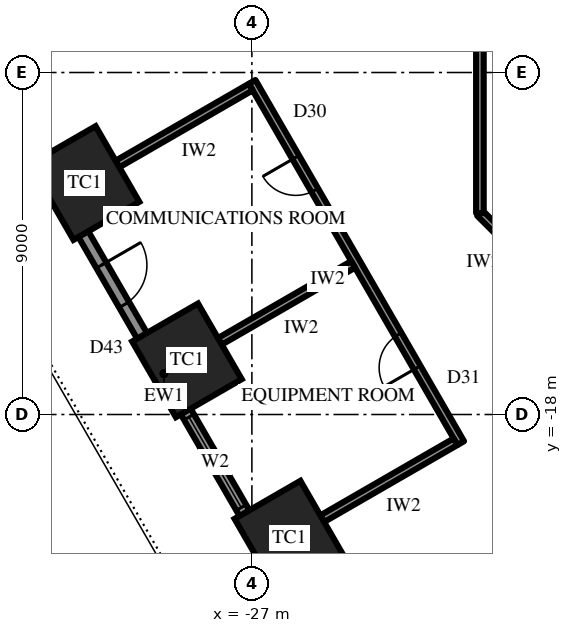
"""IFC4 building model, lengths in metres.
Left out: names, types, materials, properties, quantities, classifications, styles, units other than length and angle.
Written with IfcOpenShell. Run it as: python <this file> out.ifc"""

import sys

from ifc_helpers import new_model, si_unit, direction, frame, frame_2d, origin, origin_2d, place, context, subcontext, project, spatial, rectangle, extrude, element, fill, save


model = new_model("IFC4")
c1 = context("Model", 3, precision=1e-05, world=origin(), true_north=direction((0.0, 1.0)))
c2 = subcontext(c1, "Body", "Model", "MODEL_VIEW")
j1 = project(units=[si_unit("LENGTHUNIT", "METRE"), si_unit("PLANEANGLEUNIT", "RADIAN")], contexts=[c1])
p1 = place(None, origin())
s1 = spatial("IfcSite", under=j1, at=p1, CompositionType="ELEMENT")
p2 = place(p1, origin())
s2 = spatial("IfcBuilding", under=s1, at=p2, CompositionType="ELEMENT")
p3 = place(p2, frame((0.0, 0.0, 27.7)))
s3 = spatial("IfcBuildingStorey", under=s2, at=p3, CompositionType="ELEMENT", Elevation=27.7)
for number, where, z_axis, x_axis in (
    (1, (-31.403, -11.908, 0.0), (0.0, 0.0, 1.0), (0.5, -0.866, 0.0)),
    (2, (-28.709, -16.575, 0.0), (0.0, 0.0, 1.0), (0.5, -0.866, 0.0)),
    (3, (-26.014, -21.242, 0.0), (0.0, 0.0, 1.0), (0.5, -0.866, 0.0)),
):
    element("IfcColumn", number, at=place(p3, frame(where, z_axis=z_axis, x_axis=x_axis)), inside=s3, PredefinedType="COLUMN", context=c2, shape_type="SweptSolid", body=[
        extrude(rectangle(XDim=2.3, YDim=2.0, at=origin_2d()), origin(), (0.0, 0.0, 1.0), 4.2),
    ])
p4 = place(p3, frame((-37.398, -2.925, 0.0), z_axis=(0.0, 0.0, 1.0), x_axis=(0.499999163675, -0.866025886636, 0.0)))
e4 = element("IfcWall", 4, at=p4, inside=s3, PredefinedType="SOLIDWALL", context=c2, shape_type="SweptSolid", body=[
    extrude(rectangle(XDim=32.332, YDim=0.3, at=frame_2d((16.166, 0.0))), origin(), (0.0, 0.0, 1.0), 2.7),
])
p5 = place(p4, frame((1.319, 0.0, 0.6)))
e5 = element("IfcOpeningElement", 5, at=p5, cuts=e4, PredefinedType="OPENING", context=c2, shape_type="SweptSolid", body=[
    extrude(rectangle(XDim=2.75, YDim=1.85, at=frame_2d((1.375, 0.925))), frame((0.0, 0.16, 0.0), z_axis=(0.0, -1.0, 0.0), x_axis=(1.0, 0.0, 0.0)), (0.0, 0.0, 1.0), 0.32),
])
p6 = place(p4, frame((6.708, 0.0, 0.6)))
e6 = element("IfcOpeningElement", 6, at=p6, cuts=e4, PredefinedType="OPENING", context=c2, shape_type="SweptSolid", body=[
    extrude(rectangle(XDim=2.75, YDim=1.85, at=frame_2d((1.375, 0.925))), frame((0.0, 0.16, 0.0), z_axis=(0.0, -1.0, 0.0), x_axis=(1.0, 0.0, 0.0)), (0.0, 0.0, 1.0), 0.32),
])
p7 = place(p4, frame((12.872, 0.0, 0.0)))
e7 = element("IfcOpeningElement", 7, at=p7, cuts=e4, PredefinedType="OPENING", context=c2, shape_type="SweptSolid", body=[
    extrude(rectangle(XDim=1.2, YDim=2.4, at=frame_2d((0.6, 1.2))), frame((0.0, 0.16, 0.0), z_axis=(0.0, -1.0, 0.0), x_axis=(1.0, 0.0, 0.0)), (0.0, 0.0, 1.0), 0.32),
])
p8 = place(p4, frame((17.485, 0.0, 0.6)))
e8 = element("IfcOpeningElement", 8, at=p8, cuts=e4, PredefinedType="OPENING", context=c2, shape_type="SweptSolid", body=[
    extrude(rectangle(XDim=2.75, YDim=1.85, at=frame_2d((1.375, 0.925))), frame((0.0, 0.16, 0.0), z_axis=(0.0, -1.0, 0.0), x_axis=(1.0, 0.0, 0.0)), (0.0, 0.0, 1.0), 0.32),
])
p9 = place(p4, frame((22.874, 0.0, 0.6)))
e9 = element("IfcOpeningElement", 9, at=p9, cuts=e4, PredefinedType="OPENING", context=c2, shape_type="SweptSolid", body=[
    extrude(rectangle(XDim=2.75, YDim=1.85, at=frame_2d((1.375, 0.925))), frame((0.0, 0.16, 0.0), z_axis=(0.0, -1.0, 0.0), x_axis=(1.0, 0.0, 0.0)), (0.0, 0.0, 1.0), 0.32),
])
p10 = place(p4, frame((28.262, 0.0, 0.6)))
e10 = element("IfcOpeningElement", 10, at=p10, cuts=e4, PredefinedType="OPENING", context=c2, shape_type="SweptSolid", body=[
    extrude(rectangle(XDim=2.75, YDim=1.85, at=frame_2d((1.375, 0.925))), frame((0.0, 0.16, 0.0), z_axis=(0.0, -1.0, 0.0), x_axis=(1.0, 0.0, 0.0)), (0.0, 0.0, 1.0), 0.32),
])
p11 = place(p3, frame((-26.993, -9.247, 0.0), z_axis=(0.0, 0.0, 1.0), x_axis=(0.500002255551, -0.866024101537, 0.0)))
e11 = element("IfcWall", 11, at=p11, inside=s3, PredefinedType="PARTITIONING", context=c2, shape_type="SweptSolid", body=[
    extrude(rectangle(XDim=10.977, YDim=0.2, at=frame_2d((5.489, 0.0))), origin(), (0.0, 0.0, 1.0), 4.0),
])
p12 = place(p11, frame((2.294, 0.0, 0.0)))
e12 = element("IfcOpeningElement", 12, at=p12, cuts=e11, PredefinedType="OPENING", context=c2, shape_type="SweptSolid", body=[
    extrude(rectangle(XDim=1.0, YDim=2.2, at=frame_2d((0.5, 1.1))), frame((0.0, 0.11, 0.0), z_axis=(0.0, -1.0, 0.0), x_axis=(1.0, 0.0, 0.0)), (0.0, 0.0, 1.0), 0.22),
])
p13 = place(p11, frame((7.683, 0.0, 0.0)))
e13 = element("IfcOpeningElement", 13, at=p13, cuts=e11, PredefinedType="OPENING", context=c2, shape_type="SweptSolid", body=[
    extrude(rectangle(XDim=1.0, YDim=2.2, at=frame_2d((0.5, 1.1))), frame((0.0, 0.11, 0.0), z_axis=(0.0, -1.0, 0.0), x_axis=(1.0, 0.0, 0.0)), (0.0, 0.0, 1.0), 0.22),
])
p14 = place(p3, frame((-27.03, -9.383, 0.0), z_axis=(0.0, 0.0, 1.0), x_axis=(-0.866019956843, -0.50000943426, 0.0)))
e14 = element("IfcWall", 14, at=p14, inside=s3, PredefinedType="PARTITIONING", context=c2, shape_type="SweptSolid", body=[
    extrude(rectangle(XDim=4.05, YDim=0.2, at=frame_2d((2.025, 0.0))), origin(), (0.0, 0.0, 1.0), 2.944),
])
p15 = place(p3, frame((-24.335, -14.05, 0.0), z_axis=(0.0, 0.0, 1.0), x_axis=(-0.866046058097, -0.499964223975, 0.0)))
e15 = element("IfcWall", 15, at=p15, inside=s3, PredefinedType="PARTITIONING", context=c2, shape_type="SweptSolid", body=[
    extrude(rectangle(XDim=4.05, YDim=0.2, at=frame_2d((2.025, 0.0))), origin(), (0.0, 0.0, 1.0), 4.0),
])
p16 = place(p3, frame((-21.641, -18.717, 0.0), z_axis=(0.0, 0.0, 1.0), x_axis=(-0.866004885491, -0.500035537042, 0.0)))
e16 = element("IfcWall", 16, at=p16, inside=s3, PredefinedType="PARTITIONING", context=c2, shape_type="SweptSolid", body=[
    extrude(rectangle(XDim=4.05, YDim=0.2, at=frame_2d((2.025, 0.0))), origin(), (0.0, 0.0, 1.0), 2.992),
])
p17 = place(p3, frame((-19.6, -14.1, 0.0), z_axis=(0.0, 0.0, 1.0), x_axis=(-0.707045124756, 0.707168432242, 0.0)))
e17 = element("IfcWall", 17, at=p17, inside=s3, PredefinedType="PARTITIONING", context=c2, shape_type="SweptSolid", body=[
    extrude(rectangle(XDim=1.98, YDim=0.2, at=frame_2d((0.99, 0.0))), origin(), (0.0, 0.0, 1.0), 4.0),
])
p18 = place(p3, frame((-21.0, -12.7, 0.0), z_axis=(0.0, 0.0, 1.0), x_axis=(0.0, 1.0, 0.0)))
e18 = element("IfcWall", 18, at=p18, inside=s3, PredefinedType="PARTITIONING", context=c2, shape_type="SweptSolid", body=[
    extrude(rectangle(XDim=25.4, YDim=0.2, at=frame_2d((12.7, 0.0))), origin(), (0.0, 0.0, 1.0), 4.0),
])
p19 = place(p18, frame((11.8, 0.0, 0.0)))
e19 = element("IfcOpeningElement", 19, at=p19, cuts=e18, PredefinedType="OPENING", context=c2, shape_type="SweptSolid", body=[
    extrude(rectangle(XDim=1.8, YDim=2.4, at=frame_2d((0.9, 1.2))), frame((0.0, 0.11, 0.0), z_axis=(0.0, -1.0, 0.0), x_axis=(1.0, 0.0, 0.0)), (0.0, 0.0, 1.0), 0.22),
])
p20 = place(p7, origin())
e20 = element("IfcDoor", 20, at=p20, inside=s3, OperationType="SINGLE_SWING_RIGHT", PredefinedType="DOOR", context=c2, shape_type="SweptSolid", body=[
    extrude(rectangle(XDim=1.2, YDim=2.4, at=frame_2d((0.6, 1.2))), frame((0.0, 0.025, 0.0), z_axis=(0.0, -1.0, 0.0), x_axis=(1.0, 0.0, 0.0)), (0.0, 0.0, 1.0), 0.05),
])
fill(e7, e20)
p21 = place(p8, origin())
e21 = element("IfcWindow", 21, at=p21, inside=s3, PartitioningType="SINGLE_PANEL", PredefinedType="WINDOW", context=c2, shape_type="SweptSolid", body=[
    extrude(rectangle(XDim=2.75, YDim=1.85, at=frame_2d((1.375, 0.925))), frame((0.0, 0.03, 0.0), z_axis=(0.0, -1.0, 0.0), x_axis=(1.0, 0.0, 0.0)), (0.0, 0.0, 1.0), 0.06),
])
fill(e8, e21)
p22 = place(p12, frame((1.0, 0.0, 0.0), z_axis=(0.0, 0.0, 1.0), x_axis=(-1.0, 0.0, 0.0)))
e22 = element("IfcDoor", 22, at=p22, inside=s3, OperationType="SINGLE_SWING_LEFT", PredefinedType="DOOR", context=c2, shape_type="SweptSolid", body=[
    extrude(rectangle(XDim=1.0, YDim=2.2, at=frame_2d((0.5, 1.1))), frame((0.0, 0.025, 0.0), z_axis=(0.0, -1.0, 0.0), x_axis=(1.0, 0.0, 0.0)), (0.0, 0.0, 1.0), 0.05),
])
fill(e12, e22)
p23 = place(p13, frame((1.0, 0.0, 0.0), z_axis=(0.0, 0.0, 1.0), x_axis=(-1.0, 0.0, 0.0)))
e23 = element("IfcDoor", 23, at=p23, inside=s3, OperationType="SINGLE_SWING_RIGHT", PredefinedType="DOOR", context=c2, shape_type="SweptSolid", body=[
    extrude(rectangle(XDim=1.0, YDim=2.2, at=frame_2d((0.5, 1.1))), frame((0.0, 0.025, 0.0), z_axis=(0.0, -1.0, 0.0), x_axis=(1.0, 0.0, 0.0)), (0.0, 0.0, 1.0), 0.05),
])
fill(e13, e23)
save(model, sys.argv[1])
